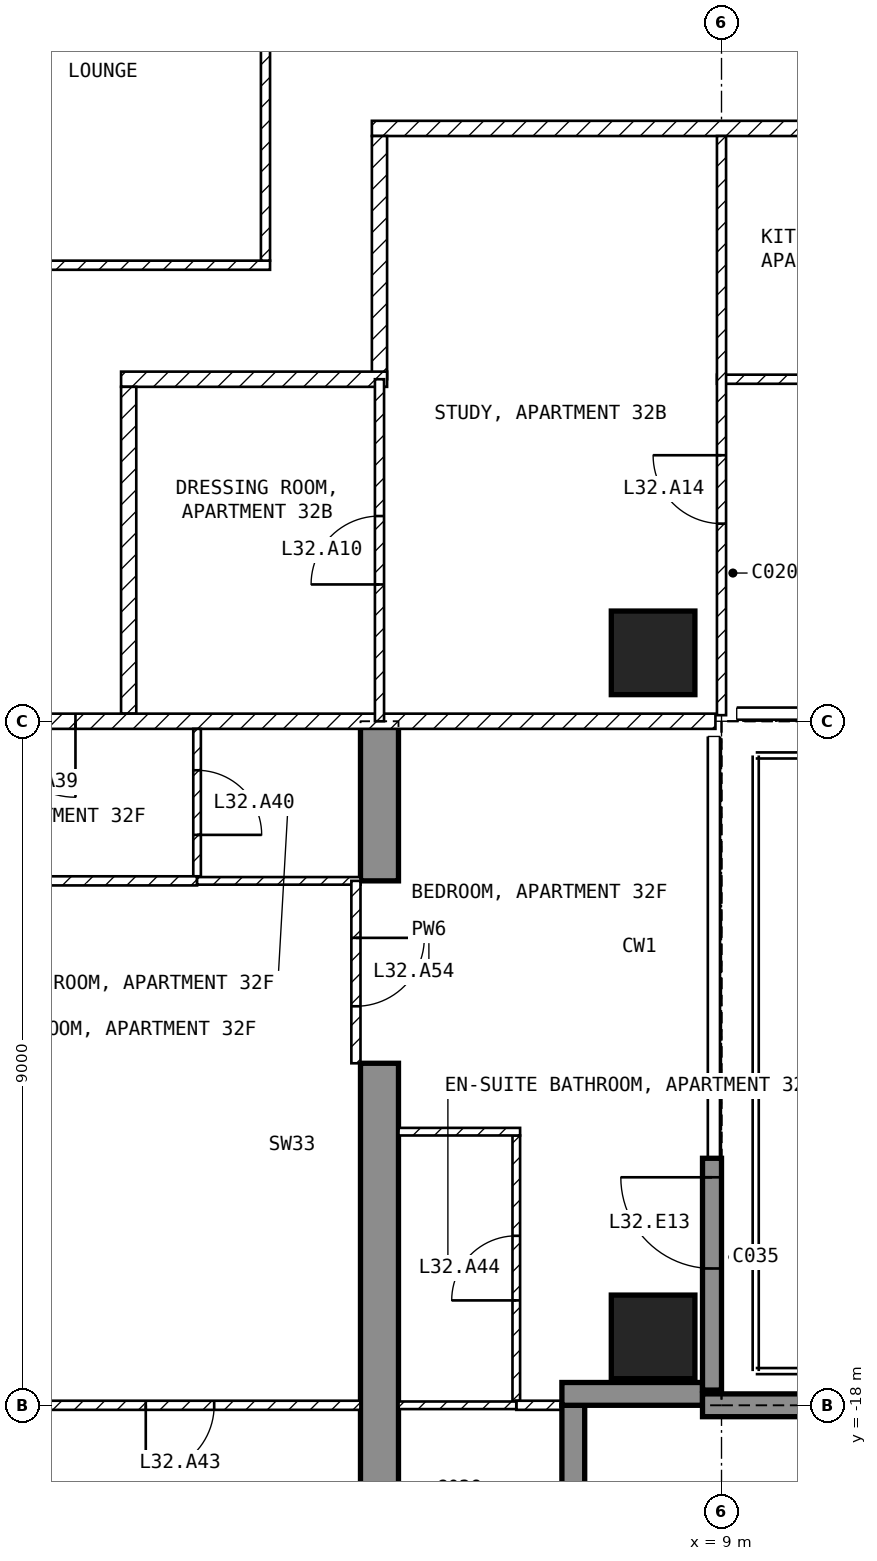
"""IFC4 building model, lengths in metres.
Left out: names, types, materials, properties, quantities, classifications, styles, units other than length and angle.
Written with IfcOpenShell. Run it as: python <this file> out.ifc"""

import sys

from ifc_helpers import new_model, si_unit, direction, frame, frame_2d, origin, origin_2d, place, context, subcontext, project, spatial, polyline, rectangle, outline, extrude, element, fill, save


model = new_model("IFC4")
c1 = context("Model", 3, precision=1e-05, world=origin(), true_north=direction((0.0, 1.0)))
c2 = subcontext(c1, "Body", "Model", "MODEL_VIEW")
j1 = project(units=[si_unit("LENGTHUNIT", "METRE"), si_unit("PLANEANGLEUNIT", "RADIAN")], contexts=[c1])
p1 = place(None, origin())
s1 = spatial("IfcSite", under=j1, at=p1, CompositionType="ELEMENT")
p2 = place(p1, origin())
s2 = spatial("IfcBuilding", under=s1, at=p2, CompositionType="ELEMENT")
p3 = place(p2, frame((0.0, 0.0, 133.9)))
s3 = spatial("IfcBuildingStorey", under=s2, at=p3, CompositionType="ELEMENT", Elevation=133.9)
for number, where, z_axis, x_axis in (
    (1, (8.1, -17.1, -0.25), (0.0, 0.0, 1.0), (1.0, 0.0, 0.0)),
    (2, (8.1, -8.1, -0.25), (0.0, 0.0, 1.0), (1.0, 0.0, 0.0)),
):
    element("IfcColumn", number, at=place(p3, frame(where, z_axis=z_axis, x_axis=x_axis)), inside=s3, PredefinedType="COLUMN", context=c2, shape_type="SweptSolid", body=[
        extrude(rectangle(XDim=1.1, YDim=1.1, at=origin_2d()), origin(), (0.0, 0.0, 1.0), 3.5),
    ])
p4 = place(p3, frame((4.25, -20.15, -0.25), z_axis=(1.0, 0.0, 0.0), x_axis=(0.0, 1.0, 0.0)))
e3 = element("IfcWall", 3, at=p4, inside=s3, PredefinedType="SHEAR", context=c2, shape_type="SweptSolid", body=[
    extrude(outline(polyline([(0.0, 0.0), (6.65, 0.0), (6.65, 2.65), (9.05, 2.65), (9.05, 0.0), (11.15, 0.0), (11.15, 3.5), (0.0, 3.5), (0.0, 0.0)])), origin(), (0.0, 0.0, 1.0), 0.5),
])
p5 = place(p3, frame((8.875, -17.8, 0.0), z_axis=(0.0, 0.0, 1.0), x_axis=(0.0, 1.0, 0.0)))
e4 = element("IfcWall", 4, at=p5, inside=s3, PredefinedType="SOLIDWALL", context=c2, shape_type="SweptSolid", body=[
    extrude(rectangle(XDim=3.05, YDim=0.25, at=frame_2d((1.525, 0.0))), origin(), (0.0, 0.0, 1.0), 3.25),
])
p6 = place(p5, frame((1.6, 0.0, 0.0)))
e5 = element("IfcOpeningElement", 5, at=p6, cuts=e4, PredefinedType="OPENING", context=c2, shape_type="SweptSolid", body=[
    extrude(rectangle(XDim=1.2, YDim=2.4, at=frame_2d((0.6, 1.2))), frame((0.0, 0.135, 0.0), z_axis=(0.0, -1.0, 0.0), x_axis=(1.0, 0.0, 0.0)), (0.0, 0.0, 1.0), 0.27),
])
p7 = place(p3, frame((7.05, -19.8, 0.0), z_axis=(0.0, 0.0, 1.0), x_axis=(0.0, 1.0, 0.0)))
e6 = element("IfcWall", 6, at=p7, inside=s3, PredefinedType="SOLIDWALL", context=c2, shape_type="SweptSolid", body=[
    extrude(rectangle(XDim=1.8, YDim=0.3, at=frame_2d((0.9, 0.0))), origin(), (0.0, 0.0, 1.0), 3.25),
])
p8 = place(p3, frame((6.9, -17.85, 0.0), z_axis=(0.0, 0.0, 1.0), x_axis=(1.0, 0.0, 0.0)))
e7 = element("IfcWall", 7, at=p8, inside=s3, PredefinedType="SOLIDWALL", context=c2, shape_type="SweptSolid", body=[
    extrude(rectangle(XDim=1.85, YDim=0.3, at=frame_2d((0.925, 0.0))), origin(), (0.0, 0.0, 1.0), 3.25),
])
p9 = place(p3, frame((8.75, -18.0, 0.0), z_axis=(0.0, 0.0, 1.0), x_axis=(1.0, 0.0, 0.0)))
e8 = element("IfcWall", 8, at=p9, inside=s3, PredefinedType="SOLIDWALL", context=c2, shape_type="SweptSolid", body=[
    extrude(rectangle(XDim=2.99, YDim=0.3, at=frame_2d((1.495, 0.0))), origin(), (0.0, 0.0, 1.0), 3.25),
])
p10 = place(p3, frame((-3.06, -3.0, 0.0), z_axis=(0.0, 0.0, 1.0), x_axis=(1.0, 0.0, 0.0)))
e9 = element("IfcWall", 9, at=p10, inside=s3, PredefinedType="PARTITIONING", context=c2, shape_type="SweptSolid", body=[
    extrude(rectangle(XDim=6.12, YDim=0.12, at=frame_2d((3.06, 0.0))), origin(), (0.0, 0.0, 1.0), 3.25),
])
p11 = place(p3, frame((3.0, -2.94, 0.0), z_axis=(0.0, 0.0, 1.0), x_axis=(0.0, 1.0, 0.0)))
e10 = element("IfcWall", 10, at=p11, inside=s3, PredefinedType="PARTITIONING", context=c2, shape_type="SweptSolid", body=[
    extrude(rectangle(XDim=5.88, YDim=0.12, at=frame_2d((2.94, 0.0))), origin(), (0.0, 0.0, 1.0), 3.25),
])
p12 = place(p3, frame((21.6, -1.2, 0.0), z_axis=(0.0, 0.0, 1.0), x_axis=(-1.0, 0.0, 0.0)))
e11 = element("IfcWall", 11, at=p12, inside=s3, PredefinedType="PARTITIONING", context=c2, shape_type="SweptSolid", body=[
    extrude(rectangle(XDim=17.2, YDim=0.2, at=frame_2d((8.6, 0.0))), origin(), (0.0, 0.0, 1.0), 3.25),
])
p13 = place(p12, frame((7.9, 0.0, 0.0)))
e12 = element("IfcOpeningElement", 12, at=p13, cuts=e11, PredefinedType="OPENING", context=c2, shape_type="SweptSolid", body=[
    extrude(rectangle(XDim=1.0, YDim=2.1, at=frame_2d((0.5, 1.05))), frame((0.0, 0.11, 0.0), z_axis=(0.0, -1.0, 0.0), x_axis=(1.0, 0.0, 0.0)), (0.0, 0.0, 1.0), 0.22),
])
p14 = place(p3, frame((4.5, -1.3, 0.0), z_axis=(0.0, 0.0, 1.0), x_axis=(0.0, -1.0, 0.0)))
e13 = element("IfcWall", 13, at=p14, inside=s3, PredefinedType="PARTITIONING", context=c2, shape_type="SweptSolid", body=[
    extrude(rectangle(XDim=3.2, YDim=0.2, at=frame_2d((1.6, 0.0))), origin(), (0.0, 0.0, 1.0), 3.25),
])
p15 = place(p3, frame((4.6, -4.5, 0.0), z_axis=(0.0, 0.0, 1.0), x_axis=(-1.0, 0.0, 0.0)))
e14 = element("IfcWall", 14, at=p15, inside=s3, PredefinedType="PARTITIONING", context=c2, shape_type="SweptSolid", body=[
    extrude(rectangle(XDim=3.5, YDim=0.2, at=frame_2d((1.75, 0.0))), origin(), (0.0, 0.0, 1.0), 3.25),
])
p16 = place(p3, frame((1.2, -4.6, 0.0), z_axis=(0.0, 0.0, 1.0), x_axis=(0.0, -1.0, 0.0)))
e15 = element("IfcWall", 15, at=p16, inside=s3, PredefinedType="PARTITIONING", context=c2, shape_type="SweptSolid", body=[
    extrude(rectangle(XDim=4.3, YDim=0.2, at=frame_2d((2.15, 0.0))), origin(), (0.0, 0.0, 1.0), 3.25),
])
p17 = place(p3, frame((8.92, -9.0, 0.0), z_axis=(0.0, 0.0, 1.0), x_axis=(-1.0, 0.0, 0.0)))
e16 = element("IfcWall", 16, at=p17, inside=s3, PredefinedType="PARTITIONING", context=c2, shape_type="SweptSolid", body=[
    extrude(rectangle(XDim=17.84, YDim=0.2, at=frame_2d((8.92, 0.0))), origin(), (0.0, 0.0, 1.0), 3.25),
])
p18 = place(p17, frame((8.42, 0.0, 0.0)))
e17 = element("IfcOpeningElement", 17, at=p18, cuts=e16, PredefinedType="OPENING", context=c2, shape_type="SweptSolid", body=[
    extrude(rectangle(XDim=1.0, YDim=2.1, at=frame_2d((0.5, 1.05))), frame((0.0, 0.11, 0.0), z_axis=(0.0, -1.0, 0.0), x_axis=(1.0, 0.0, 0.0)), (0.0, 0.0, 1.0), 0.22),
])
p19 = place(p3, frame((16.8, -4.5, 0.0), z_axis=(0.0, 0.0, 1.0), x_axis=(-1.0, 0.0, 0.0)))
e18 = element("IfcWall", 18, at=p19, inside=s3, PredefinedType="PARTITIONING", context=c2, shape_type="SweptSolid", body=[
    extrude(rectangle(XDim=7.86, YDim=0.12, at=frame_2d((3.93, 0.0))), origin(), (0.0, 0.0, 1.0), 3.25),
])
p20 = place(p19, frame((3.15, 0.0, 0.0)))
e19 = element("IfcOpeningElement", 19, at=p20, cuts=e18, PredefinedType="OPENING", context=c2, shape_type="SweptSolid", body=[
    extrude(rectangle(XDim=0.9, YDim=2.1, at=frame_2d((0.45, 1.05))), frame((0.0, 0.07, 0.0), z_axis=(0.0, -1.0, 0.0), x_axis=(1.0, 0.0, 0.0)), (0.0, 0.0, 1.0), 0.14),
])
p21 = place(p3, frame((9.0, -8.92, 0.0), z_axis=(0.0, 0.0, 1.0), x_axis=(0.0, 1.0, 0.0)))
e20 = element("IfcWall", 20, at=p21, inside=s3, PredefinedType="PARTITIONING", context=c2, shape_type="SweptSolid", body=[
    extrude(rectangle(XDim=7.62, YDim=0.12, at=frame_2d((3.81, 0.0))), origin(), (0.0, 0.0, 1.0), 3.25),
])
p22 = place(p21, frame((2.52, 0.0, 0.0)))
e21 = element("IfcOpeningElement", 21, at=p22, cuts=e20, PredefinedType="OPENING", context=c2, shape_type="SweptSolid", body=[
    extrude(rectangle(XDim=0.9, YDim=2.1, at=frame_2d((0.45, 1.05))), frame((0.0, 0.07, 0.0), z_axis=(0.0, -1.0, 0.0), x_axis=(1.0, 0.0, 0.0)), (0.0, 0.0, 1.0), 0.14),
])
p23 = place(p3, frame((4.5, -9.0, 0.0), z_axis=(0.0, 0.0, 1.0), x_axis=(0.0, 1.0, 0.0)))
e22 = element("IfcWall", 22, at=p23, inside=s3, PredefinedType="PARTITIONING", context=c2, shape_type="SweptSolid", body=[
    extrude(rectangle(XDim=4.5, YDim=0.12, at=frame_2d((2.25, 0.0))), origin(), (0.0, 0.0, 1.0), 3.25),
])
p24 = place(p23, frame((1.8, 0.0, 0.0)))
e23 = element("IfcOpeningElement", 23, at=p24, cuts=e22, PredefinedType="OPENING", context=c2, shape_type="SweptSolid", body=[
    extrude(rectangle(XDim=0.9, YDim=2.1, at=frame_2d((0.45, 1.05))), frame((0.0, 0.07, 0.0), z_axis=(0.0, -1.0, 0.0), x_axis=(1.0, 0.0, 0.0)), (0.0, 0.0, 1.0), 0.14),
])
p25 = place(p3, frame((2.1, -9.1, 0.0), z_axis=(0.0, 0.0, 1.0), x_axis=(0.0, -1.0, 0.0)))
e24 = element("IfcWall", 24, at=p25, inside=s3, PredefinedType="PARTITIONING", context=c2, shape_type="SweptSolid", body=[
    extrude(rectangle(XDim=1.94, YDim=0.1, at=frame_2d((0.97, 0.0))), origin(), (0.0, 0.0, 1.0), 3.25),
])
p26 = place(p25, frame((0.545, 0.0, 0.0)))
e25 = element("IfcOpeningElement", 25, at=p26, cuts=e24, PredefinedType="OPENING", context=c2, shape_type="SweptSolid", body=[
    extrude(rectangle(XDim=0.85, YDim=2.1, at=frame_2d((0.425, 1.05))), frame((0.0, 0.06, 0.0), z_axis=(0.0, -1.0, 0.0), x_axis=(1.0, 0.0, 0.0)), (0.0, 0.0, 1.0), 0.12),
])
p27 = place(p3, frame((2.1, -11.1, 0.0), z_axis=(0.0, 0.0, 1.0), x_axis=(-1.0, 0.0, 0.0)))
e26 = element("IfcWall", 26, at=p27, inside=s3, PredefinedType="PARTITIONING", context=c2, shape_type="SweptSolid", body=[
    extrude(rectangle(XDim=6.35, YDim=0.12, at=frame_2d((3.175, 0.0))), origin(), (0.0, 0.0, 1.0), 3.25),
])
p28 = place(p27, frame((2.725, 0.0, 0.0)))
e27 = element("IfcOpeningElement", 27, at=p28, cuts=e26, PredefinedType="OPENING", context=c2, shape_type="SweptSolid", body=[
    extrude(rectangle(XDim=0.9, YDim=2.1, at=frame_2d((0.45, 1.05))), frame((0.0, 0.07, 0.0), z_axis=(0.0, -1.0, 0.0), x_axis=(1.0, 0.0, 0.0)), (0.0, 0.0, 1.0), 0.14),
])
p29 = place(p3, frame((4.25, -11.1, 0.0), z_axis=(0.0, 0.0, 1.0), x_axis=(-1.0, 0.0, 0.0)))
e28 = element("IfcWall", 28, at=p29, inside=s3, PredefinedType="PARTITIONING", context=c2, shape_type="SweptSolid", body=[
    extrude(rectangle(XDim=2.15, YDim=0.1, at=frame_2d((1.075, 0.0))), origin(), (0.0, 0.0, 1.0), 3.25),
])
p30 = place(p3, frame((4.25, -18.0, 0.0), z_axis=(0.0, 0.0, 1.0), x_axis=(-1.0, 0.0, 0.0)))
e29 = element("IfcWall", 29, at=p30, inside=s3, PredefinedType="PARTITIONING", context=c2, shape_type="SweptSolid", body=[
    extrude(rectangle(XDim=8.5, YDim=0.12, at=frame_2d((4.25, 0.0))), origin(), (0.0, 0.0, 1.0), 3.25),
])
p31 = place(p30, frame((1.925, 0.0, 0.0)))
e30 = element("IfcOpeningElement", 30, at=p31, cuts=e29, PredefinedType="OPENING", context=c2, shape_type="SweptSolid", body=[
    extrude(rectangle(XDim=0.9, YDim=2.1, at=frame_2d((0.45, 1.05))), frame((0.0, 0.07, 0.0), z_axis=(0.0, -1.0, 0.0), x_axis=(1.0, 0.0, 0.0)), (0.0, 0.0, 1.0), 0.14),
])
p32 = place(p3, frame((6.3, -17.94, 0.0), z_axis=(0.0, 0.0, 1.0), x_axis=(0.0, 1.0, 0.0)))
e31 = element("IfcWall", 31, at=p32, inside=s3, PredefinedType="PARTITIONING", context=c2, shape_type="SweptSolid", body=[
    extrude(rectangle(XDim=3.49, YDim=0.1, at=frame_2d((1.745, 0.0))), origin(), (0.0, 0.0, 1.0), 3.25),
])
p33 = place(p32, frame((1.32, 0.0, 0.0)))
e32 = element("IfcOpeningElement", 32, at=p33, cuts=e31, PredefinedType="OPENING", context=c2, shape_type="SweptSolid", body=[
    extrude(rectangle(XDim=0.85, YDim=2.1, at=frame_2d((0.425, 1.05))), frame((0.0, 0.06, 0.0), z_axis=(0.0, -1.0, 0.0), x_axis=(1.0, 0.0, 0.0)), (0.0, 0.0, 1.0), 0.12),
])
p34 = place(p3, frame((6.35, -14.4, 0.0), z_axis=(0.0, 0.0, 1.0), x_axis=(-1.0, 0.0, 0.0)))
e33 = element("IfcWall", 33, at=p34, inside=s3, PredefinedType="PARTITIONING", context=c2, shape_type="SweptSolid", body=[
    extrude(rectangle(XDim=1.6, YDim=0.1, at=frame_2d((0.8, 0.0))), origin(), (0.0, 0.0, 1.0), 3.25),
])
p35 = place(p3, frame((7.12, -18.0, 0.0), z_axis=(0.0, 0.0, 1.0), x_axis=(-1.0, 0.0, 0.0)))
e34 = element("IfcWall", 34, at=p35, inside=s3, PredefinedType="PARTITIONING", context=c2, shape_type="SweptSolid", body=[
    extrude(rectangle(XDim=0.82, YDim=0.12, at=frame_2d((0.41, 0.0))), origin(), (0.0, 0.0, 1.0), 3.25),
])
p36 = place(p3, frame((6.3, -18.0, 0.0), z_axis=(0.0, 0.0, 1.0), x_axis=(-1.0, 0.0, 0.0)))
e35 = element("IfcWall", 35, at=p36, inside=s3, PredefinedType="PARTITIONING", context=c2, shape_type="SweptSolid", body=[
    extrude(rectangle(XDim=1.55, YDim=0.1, at=frame_2d((0.775, 0.0))), origin(), (0.0, 0.0, 1.0), 3.25),
])
p37 = place(p3, frame((4.19, -11.1, 0.0), z_axis=(0.0, 0.0, 1.0), x_axis=(0.0, -1.0, 0.0)))
e36 = element("IfcWall", 36, at=p37, inside=s3, PredefinedType="PARTITIONING", context=c2, shape_type="SweptSolid", body=[
    extrude(rectangle(XDim=2.4, YDim=0.12, at=frame_2d((1.2, 0.0))), origin(), (0.0, 0.0, 1.0), 2.4),
])
p38 = place(p37, frame((0.75, 0.0, 0.0)))
e37 = element("IfcOpeningElement", 37, at=p38, cuts=e36, PredefinedType="OPENING", context=c2, shape_type="SweptSolid", body=[
    extrude(rectangle(XDim=0.9, YDim=2.1, at=frame_2d((0.45, 1.05))), frame((0.0, 0.07, 0.0), z_axis=(0.0, -1.0, 0.0), x_axis=(1.0, 0.0, 0.0)), (0.0, 0.0, 1.0), 0.14),
])
p39 = place(p6, origin())
e38 = element("IfcDoor", 38, at=p39, inside=s3, OperationType="SINGLE_SWING_RIGHT", PredefinedType="DOOR", context=c2, shape_type="SweptSolid", body=[
    extrude(rectangle(XDim=1.2, YDim=2.4, at=frame_2d((0.6, 1.2))), frame((0.0, 0.025, 0.0), z_axis=(0.0, -1.0, 0.0), x_axis=(1.0, 0.0, 0.0)), (0.0, 0.0, 1.0), 0.05),
])
fill(e5, e38)
p40 = place(p24, origin())
e39 = element("IfcDoor", 39, at=p40, inside=s3, OperationType="SINGLE_SWING_LEFT", PredefinedType="DOOR", context=c2, shape_type="SweptSolid", body=[
    extrude(rectangle(XDim=0.9, YDim=2.1, at=frame_2d((0.45, 1.05))), frame((0.0, 0.025, 0.0), z_axis=(0.0, -1.0, 0.0), x_axis=(1.0, 0.0, 0.0)), (0.0, 0.0, 1.0), 0.05),
])
fill(e23, e39)
p41 = place(p22, origin())
e40 = element("IfcDoor", 40, at=p41, inside=s3, OperationType="SINGLE_SWING_RIGHT", PredefinedType="DOOR", context=c2, shape_type="SweptSolid", body=[
    extrude(rectangle(XDim=0.9, YDim=2.1, at=frame_2d((0.45, 1.05))), frame((0.0, 0.025, 0.0), z_axis=(0.0, -1.0, 0.0), x_axis=(1.0, 0.0, 0.0)), (0.0, 0.0, 1.0), 0.05),
])
fill(e21, e40)
p42 = place(p18, origin())
e41 = element("IfcDoor", 41, at=p42, inside=s3, OperationType="SINGLE_SWING_LEFT", PredefinedType="DOOR", context=c2, shape_type="SweptSolid", body=[
    extrude(rectangle(XDim=1.0, YDim=2.1, at=frame_2d((0.5, 1.05))), frame((0.0, 0.025, 0.0), z_axis=(0.0, -1.0, 0.0), x_axis=(1.0, 0.0, 0.0)), (0.0, 0.0, 1.0), 0.05),
])
fill(e17, e41)
p43 = place(p26, origin())
e42 = element("IfcDoor", 42, at=p43, inside=s3, OperationType="SINGLE_SWING_RIGHT", PredefinedType="DOOR", context=c2, shape_type="SweptSolid", body=[
    extrude(rectangle(XDim=0.85, YDim=2.1, at=frame_2d((0.425, 1.05))), frame((0.0, 0.025, 0.0), z_axis=(0.0, -1.0, 0.0), x_axis=(1.0, 0.0, 0.0)), (0.0, 0.0, 1.0), 0.05),
])
fill(e25, e42)
p44 = place(p31, origin())
e43 = element("IfcDoor", 43, at=p44, inside=s3, OperationType="SINGLE_SWING_RIGHT", PredefinedType="DOOR", context=c2, shape_type="SweptSolid", body=[
    extrude(rectangle(XDim=0.9, YDim=2.1, at=frame_2d((0.45, 1.05))), frame((0.0, 0.025, 0.0), z_axis=(0.0, -1.0, 0.0), x_axis=(1.0, 0.0, 0.0)), (0.0, 0.0, 1.0), 0.05),
])
fill(e30, e43)
p45 = place(p33, origin())
e44 = element("IfcDoor", 44, at=p45, inside=s3, OperationType="SINGLE_SWING_LEFT", PredefinedType="DOOR", context=c2, shape_type="SweptSolid", body=[
    extrude(rectangle(XDim=0.85, YDim=2.1, at=frame_2d((0.425, 1.05))), frame((0.0, 0.025, 0.0), z_axis=(0.0, -1.0, 0.0), x_axis=(1.0, 0.0, 0.0)), (0.0, 0.0, 1.0), 0.05),
])
fill(e32, e44)
p46 = place(p38, origin())
e45 = element("IfcDoor", 45, at=p46, inside=s3, OperationType="SINGLE_SWING_LEFT", PredefinedType="DOOR", context=c2, shape_type="SweptSolid", body=[
    extrude(rectangle(XDim=0.9, YDim=2.1, at=frame_2d((0.45, 1.05))), frame((0.0, 0.025, 0.0), z_axis=(0.0, -1.0, 0.0), x_axis=(1.0, 0.0, 0.0)), (0.0, 0.0, 1.0), 0.05),
])
fill(e37, e45)
save(model, sys.argv[1])
